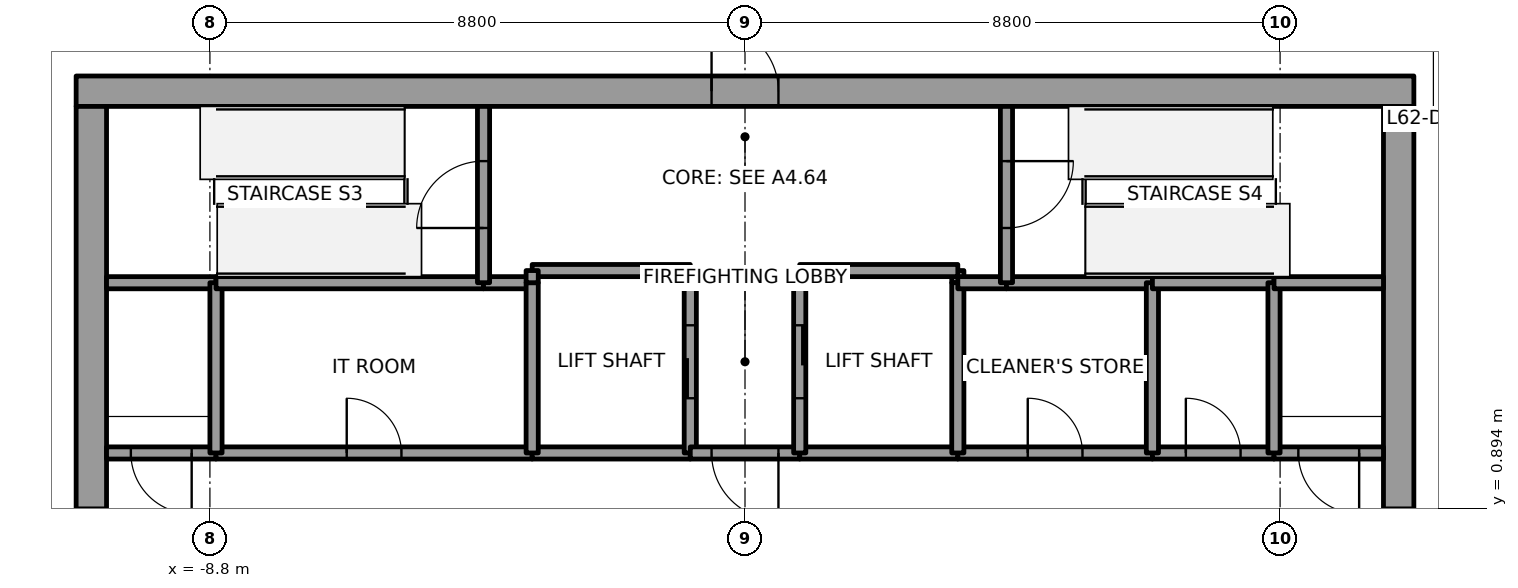
"""IFC4 building model, lengths in metres.
Left out: names, types, materials, properties, quantities, classifications, styles, units other than length and angle.
Written with IfcOpenShell. Run it as: python <this file> out.ifc"""

import sys

from ifc_helpers import new_model, si_unit, direction, frame, frame_2d, origin, place, context, subcontext, project, spatial, rectangle, extrude, element, fill, save


model = new_model("IFC4")
c1 = context("Model", 3, precision=1e-05, world=origin(), true_north=direction((0.0, 1.0)))
c2 = subcontext(c1, "Body", "Model", "MODEL_VIEW")
j1 = project(units=[si_unit("LENGTHUNIT", "METRE"), si_unit("PLANEANGLEUNIT", "RADIAN")], contexts=[c1])
p1 = place(None, origin())
s1 = spatial("IfcSite", under=j1, at=p1, CompositionType="ELEMENT")
p2 = place(p1, origin())
s2 = spatial("IfcBuilding", under=s1, at=p2, CompositionType="ELEMENT")
p3 = place(p2, frame((0.0, 0.0, 275.0)))
s3 = spatial("IfcBuildingStorey", under=s2, at=p3, CompositionType="ELEMENT", Elevation=275.0)
p4 = place(p3, frame((-11.0, 7.75, 0.0), z_axis=(0.0, 0.0, 1.0), x_axis=(1.0, 0.0, 0.0)))
e1 = element("IfcWall", 1, at=p4, inside=s3, PredefinedType="SHEAR", context=c2, shape_type="SweptSolid", body=[
    extrude(rectangle(XDim=22.0, YDim=0.5, at=frame_2d((11.0, 0.0))), origin(), (0.0, 0.0, 1.0), 4.0),
])
p5 = place(p4, frame((10.45, 0.0, 0.0)))
e2 = element("IfcOpeningElement", 2, at=p5, cuts=e1, PredefinedType="OPENING", context=c2, shape_type="SweptSolid", body=[
    extrude(rectangle(XDim=1.1, YDim=2.1, at=frame_2d((0.55, 1.05))), frame((0.0, 0.25, 0.0), z_axis=(0.0, -1.0, 0.0), x_axis=(1.0, 0.0, 0.0)), (0.0, 0.0, 1.0), 0.5),
])
p6 = place(p3, frame((-10.75, -7.5, 0.0), z_axis=(0.0, 0.0, 1.0), x_axis=(0.0, 1.0, 0.0)))
e3 = element("IfcWall", 3, at=p6, inside=s3, PredefinedType="SHEAR", context=c2, shape_type="SweptSolid", body=[
    extrude(rectangle(XDim=15.0, YDim=0.5, at=frame_2d((7.5, 0.0))), origin(), (0.0, 0.0, 1.0), 4.0),
])
p7 = place(p6, frame((6.6, 0.0, 0.0)))
e4 = element("IfcOpeningElement", 4, at=p7, cuts=e3, PredefinedType="OPENING", context=c2, shape_type="SweptSolid", body=[
    extrude(rectangle(XDim=1.8, YDim=2.1, at=frame_2d((0.9, 1.05))), frame((0.0, 0.25, 0.0), z_axis=(0.0, -1.0, 0.0), x_axis=(1.0, 0.0, 0.0)), (0.0, 0.0, 1.0), 0.5),
])
p8 = place(p3, frame((10.75, -7.5, 0.0), z_axis=(0.0, 0.0, 1.0), x_axis=(0.0, 1.0, 0.0)))
e5 = element("IfcWall", 5, at=p8, inside=s3, PredefinedType="SHEAR", context=c2, shape_type="SweptSolid", body=[
    extrude(rectangle(XDim=15.0, YDim=0.5, at=frame_2d((7.5, 0.0))), origin(), (0.0, 0.0, 1.0), 4.0),
])
p9 = place(p8, frame((6.6, 0.0, 0.0)))
e6 = element("IfcOpeningElement", 6, at=p9, cuts=e5, PredefinedType="OPENING", context=c2, shape_type="SweptSolid", body=[
    extrude(rectangle(XDim=1.8, YDim=2.1, at=frame_2d((0.9, 1.05))), frame((0.0, 0.25, 0.0), z_axis=(0.0, -1.0, 0.0), x_axis=(1.0, 0.0, 0.0)), (0.0, 0.0, 1.0), 0.5),
])
p10 = place(p3, frame((12.302, 8.068, 0.0), z_axis=(0.0, 0.0, 1.0), x_axis=(-0.523107588239, 0.852266654943, 0.0)))
e7 = element("IfcWall", 7, at=p10, inside=s3, PredefinedType="SOLIDWALL", context=c2, shape_type="SweptSolid", body=[
    extrude(rectangle(XDim=3.882, YDim=0.2, at=frame_2d((1.941, 0.0))), origin(), (0.0, 0.0, 1.0), 3.34),
])
p11 = place(p10, frame((1.326, 0.0, 0.0)))
e8 = element("IfcOpeningElement", 8, at=p11, cuts=e7, PredefinedType="OPENING", context=c2, shape_type="SweptSolid", body=[
    extrude(rectangle(XDim=1.1, YDim=2.1, at=frame_2d((0.55, 1.05))), frame((0.0, 0.1, 0.0), z_axis=(0.0, -1.0, 0.0), x_axis=(1.0, 0.0, 0.0)), (0.0, 0.0, 1.0), 0.2),
])
p12 = place(p3, frame((-8.7, 1.8, 0.0), z_axis=(0.0, 0.0, 1.0), x_axis=(-1.0, 0.0, 0.0)))
e9 = element("IfcWall", 9, at=p12, inside=s3, PredefinedType="SOLIDWALL", context=c2, shape_type="SweptSolid", body=[
    extrude(rectangle(XDim=1.8, YDim=0.2, at=frame_2d((0.9, 0.0))), origin(), (0.0, 0.0, 1.0), 3.85),
])
p13 = place(p12, frame((0.4, 0.0, 0.0)))
e10 = element("IfcOpeningElement", 10, at=p13, cuts=e9, PredefinedType="OPENING", context=c2, shape_type="SweptSolid", body=[
    extrude(rectangle(XDim=1.0, YDim=2.1, at=frame_2d((0.5, 1.05))), frame((0.0, 0.1, 0.0), z_axis=(0.0, -1.0, 0.0), x_axis=(1.0, 0.0, 0.0)), (0.0, 0.0, 1.0), 0.2),
])
p14 = place(p3, frame((-8.7, 4.6, 0.0), z_axis=(0.0, 0.0, 1.0), x_axis=(-1.0, 0.0, 0.0)))
e11 = element("IfcWall", 11, at=p14, inside=s3, PredefinedType="SOLIDWALL", context=c2, shape_type="SweptSolid", body=[
    extrude(rectangle(XDim=1.8, YDim=0.2, at=frame_2d((0.9, 0.0))), origin(), (0.0, 0.0, 1.0), 3.85),
])
p15 = place(p3, frame((-8.7, 1.8, 0.0), z_axis=(0.0, 0.0, 1.0), x_axis=(1.0, 0.0, 0.0)))
e12 = element("IfcWall", 12, at=p15, inside=s3, PredefinedType="SOLIDWALL", context=c2, shape_type="SweptSolid", body=[
    extrude(rectangle(XDim=5.2, YDim=0.2, at=frame_2d((2.6, 0.0))), origin(), (0.0, 0.0, 1.0), 3.85),
])
p16 = place(p15, frame((2.15, 0.0, 0.0)))
e13 = element("IfcOpeningElement", 13, at=p16, cuts=e12, PredefinedType="OPENING", context=c2, shape_type="SweptSolid", body=[
    extrude(rectangle(XDim=0.9, YDim=2.1, at=frame_2d((0.45, 1.05))), frame((0.0, 0.1, 0.0), z_axis=(0.0, -1.0, 0.0), x_axis=(1.0, 0.0, 0.0)), (0.0, 0.0, 1.0), 0.2),
])
p17 = place(p3, frame((-8.7, 4.6, 0.0), z_axis=(0.0, 0.0, 1.0), x_axis=(0.0, -1.0, 0.0)))
e14 = element("IfcWall", 14, at=p17, inside=s3, PredefinedType="SOLIDWALL", context=c2, shape_type="SweptSolid", body=[
    extrude(rectangle(XDim=2.8, YDim=0.2, at=frame_2d((1.4, 0.0))), origin(), (0.0, 0.0, 1.0), 3.85),
])
p18 = place(p3, frame((-4.3, 4.6, 0.0), z_axis=(0.0, 0.0, 1.0), x_axis=(-1.0, 0.0, 0.0)))
e15 = element("IfcWall", 15, at=p18, inside=s3, PredefinedType="SOLIDWALL", context=c2, shape_type="SweptSolid", body=[
    extrude(rectangle(XDim=4.4, YDim=0.2, at=frame_2d((2.2, 0.0))), origin(), (0.0, 0.0, 1.0), 3.85),
])
p19 = place(p3, frame((-3.5, 4.6, 0.0), z_axis=(0.0, 0.0, 1.0), x_axis=(-1.0, 0.0, 0.0)))
e16 = element("IfcWall", 16, at=p19, inside=s3, PredefinedType="SOLIDWALL", context=c2, shape_type="SweptSolid", body=[
    extrude(rectangle(XDim=0.8, YDim=0.2, at=frame_2d((0.4, 0.0))), origin(), (0.0, 0.0, 1.0), 3.85),
])
p20 = place(p3, frame((-4.3, 4.6, 0.0), z_axis=(0.0, 0.0, 1.0), x_axis=(0.0, 1.0, 0.0)))
e17 = element("IfcWall", 17, at=p20, inside=s3, PredefinedType="SOLIDWALL", context=c2, shape_type="SweptSolid", body=[
    extrude(rectangle(XDim=2.9, YDim=0.2, at=frame_2d((1.45, 0.0))), origin(), (0.0, 0.0, 1.0), 3.85),
])
p21 = place(p20, frame((0.9, 0.0, 0.0)))
e18 = element("IfcOpeningElement", 18, at=p21, cuts=e17, PredefinedType="OPENING", context=c2, shape_type="SweptSolid", body=[
    extrude(rectangle(XDim=1.1, YDim=2.1, at=frame_2d((0.55, 1.05))), frame((0.0, 0.1, 0.0), z_axis=(0.0, -1.0, 0.0), x_axis=(1.0, 0.0, 0.0)), (0.0, 0.0, 1.0), 0.2),
])
p22 = place(p3, frame((-0.9, 1.8, 0.0), z_axis=(0.0, 0.0, 1.0), x_axis=(-1.0, 0.0, 0.0)))
e19 = element("IfcWall", 19, at=p22, inside=s3, PredefinedType="SOLIDWALL", context=c2, shape_type="SweptSolid", body=[
    extrude(rectangle(XDim=2.6, YDim=0.2, at=frame_2d((1.3, 0.0))), origin(), (0.0, 0.0, 1.0), 3.85),
])
p23 = place(p3, frame((-3.5, 1.8, 0.0), z_axis=(0.0, 0.0, 1.0), x_axis=(0.0, 1.0, 0.0)))
e20 = element("IfcWall", 20, at=p23, inside=s3, PredefinedType="SOLIDWALL", context=c2, shape_type="SweptSolid", body=[
    extrude(rectangle(XDim=2.8, YDim=0.2, at=frame_2d((1.4, 0.0))), origin(), (0.0, 0.0, 1.0), 3.85),
])
p24 = place(p3, frame((-0.9, 1.8, 0.0), z_axis=(0.0, 0.0, 1.0), x_axis=(0.0, 1.0, 0.0)))
e21 = element("IfcWall", 21, at=p24, inside=s3, PredefinedType="SOLIDWALL", context=c2, shape_type="SweptSolid", body=[
    extrude(rectangle(XDim=3.0, YDim=0.2, at=frame_2d((1.5, 0.0))), origin(), (0.0, 0.0, 1.0), 3.85),
])
p25 = place(p24, frame((0.9, 0.0, 0.0)))
e22 = element("IfcOpeningElement", 22, at=p25, cuts=e21, PredefinedType="OPENING", context=c2, shape_type="SweptSolid", body=[
    extrude(rectangle(XDim=1.2, YDim=2.1, at=frame_2d((0.6, 1.05))), frame((0.0, 0.1, 0.0), z_axis=(0.0, -1.0, 0.0), x_axis=(1.0, 0.0, 0.0)), (0.0, 0.0, 1.0), 0.2),
])
p26 = place(p3, frame((-0.9, 4.8, 0.0), z_axis=(0.0, 0.0, 1.0), x_axis=(-1.0, 0.0, 0.0)))
e23 = element("IfcWall", 23, at=p26, inside=s3, PredefinedType="SOLIDWALL", context=c2, shape_type="SweptSolid", body=[
    extrude(rectangle(XDim=2.6, YDim=0.2, at=frame_2d((1.3, 0.0))), origin(), (0.0, 0.0, 1.0), 3.85),
])
p27 = place(p3, frame((-3.5, 4.8, 0.0), z_axis=(0.0, 0.0, 1.0), x_axis=(0.0, -1.0, 0.0)))
e24 = element("IfcWall", 24, at=p27, inside=s3, PredefinedType="SOLIDWALL", context=c2, shape_type="SweptSolid", body=[
    extrude(rectangle(XDim=0.2, YDim=0.2, at=frame_2d((0.1, 0.0))), origin(), (0.0, 0.0, 1.0), 3.85),
])
p28 = place(p3, frame((0.9, 1.8, 0.0), z_axis=(0.0, 0.0, 1.0), x_axis=(-1.0, 0.0, 0.0)))
e25 = element("IfcWall", 25, at=p28, inside=s3, PredefinedType="SOLIDWALL", context=c2, shape_type="SweptSolid", body=[
    extrude(rectangle(XDim=1.8, YDim=0.2, at=frame_2d((0.9, 0.0))), origin(), (0.0, 0.0, 1.0), 3.85),
])
p29 = place(p28, frame((0.35, 0.0, 0.0)))
e26 = element("IfcOpeningElement", 26, at=p29, cuts=e25, PredefinedType="OPENING", context=c2, shape_type="SweptSolid", body=[
    extrude(rectangle(XDim=1.1, YDim=2.1, at=frame_2d((0.55, 1.05))), frame((0.0, 0.1, 0.0), z_axis=(0.0, -1.0, 0.0), x_axis=(1.0, 0.0, 0.0)), (0.0, 0.0, 1.0), 0.2),
])
p30 = place(p3, frame((3.5, 1.8, 0.0), z_axis=(0.0, 0.0, 1.0), x_axis=(-1.0, 0.0, 0.0)))
e27 = element("IfcWall", 27, at=p30, inside=s3, PredefinedType="SOLIDWALL", context=c2, shape_type="SweptSolid", body=[
    extrude(rectangle(XDim=2.6, YDim=0.2, at=frame_2d((1.3, 0.0))), origin(), (0.0, 0.0, 1.0), 3.85),
])
p31 = place(p3, frame((3.5, 4.6, 0.0), z_axis=(0.0, 0.0, 1.0), x_axis=(0.0, 1.0, 0.0)))
e28 = element("IfcWall", 28, at=p31, inside=s3, PredefinedType="SOLIDWALL", context=c2, shape_type="SweptSolid", body=[
    extrude(rectangle(XDim=0.2, YDim=0.2, at=frame_2d((0.1, 0.0))), origin(), (0.0, 0.0, 1.0), 3.85),
])
p32 = place(p3, frame((3.5, 4.8, 0.0), z_axis=(0.0, 0.0, 1.0), x_axis=(-1.0, 0.0, 0.0)))
e29 = element("IfcWall", 29, at=p32, inside=s3, PredefinedType="SOLIDWALL", context=c2, shape_type="SweptSolid", body=[
    extrude(rectangle(XDim=2.6, YDim=0.2, at=frame_2d((1.3, 0.0))), origin(), (0.0, 0.0, 1.0), 3.85),
])
p33 = place(p3, frame((0.9, 4.8, 0.0), z_axis=(0.0, 0.0, 1.0), x_axis=(0.0, -1.0, 0.0)))
e30 = element("IfcWall", 30, at=p33, inside=s3, PredefinedType="SOLIDWALL", context=c2, shape_type="SweptSolid", body=[
    extrude(rectangle(XDim=3.0, YDim=0.2, at=frame_2d((1.5, 0.0))), origin(), (0.0, 0.0, 1.0), 3.85),
])
p34 = place(p33, frame((0.9, 0.0, 0.0)))
e31 = element("IfcOpeningElement", 31, at=p34, cuts=e30, PredefinedType="OPENING", context=c2, shape_type="SweptSolid", body=[
    extrude(rectangle(XDim=1.2, YDim=2.1, at=frame_2d((0.6, 1.05))), frame((0.0, 0.1, 0.0), z_axis=(0.0, -1.0, 0.0), x_axis=(1.0, 0.0, 0.0)), (0.0, 0.0, 1.0), 0.2),
])
p35 = place(p3, frame((3.5, 1.8, 0.0), z_axis=(0.0, 0.0, 1.0), x_axis=(1.0, 0.0, 0.0)))
e32 = element("IfcWall", 32, at=p35, inside=s3, PredefinedType="SOLIDWALL", context=c2, shape_type="SweptSolid", body=[
    extrude(rectangle(XDim=3.2, YDim=0.2, at=frame_2d((1.6, 0.0))), origin(), (0.0, 0.0, 1.0), 3.85),
])
p36 = place(p35, frame((1.15, 0.0, 0.0)))
e33 = element("IfcOpeningElement", 33, at=p36, cuts=e32, PredefinedType="OPENING", context=c2, shape_type="SweptSolid", body=[
    extrude(rectangle(XDim=0.9, YDim=2.1, at=frame_2d((0.45, 1.05))), frame((0.0, 0.1, 0.0), z_axis=(0.0, -1.0, 0.0), x_axis=(1.0, 0.0, 0.0)), (0.0, 0.0, 1.0), 0.2),
])
p37 = place(p3, frame((3.5, 4.6, 0.0), z_axis=(0.0, 0.0, 1.0), x_axis=(0.0, -1.0, 0.0)))
e34 = element("IfcWall", 34, at=p37, inside=s3, PredefinedType="SOLIDWALL", context=c2, shape_type="SweptSolid", body=[
    extrude(rectangle(XDim=2.8, YDim=0.2, at=frame_2d((1.4, 0.0))), origin(), (0.0, 0.0, 1.0), 3.85),
])
p38 = place(p3, frame((4.3, 4.6, 0.0), z_axis=(0.0, 0.0, 1.0), x_axis=(-1.0, 0.0, 0.0)))
e35 = element("IfcWall", 35, at=p38, inside=s3, PredefinedType="SOLIDWALL", context=c2, shape_type="SweptSolid", body=[
    extrude(rectangle(XDim=0.8, YDim=0.2, at=frame_2d((0.4, 0.0))), origin(), (0.0, 0.0, 1.0), 3.85),
])
p39 = place(p3, frame((6.7, 4.6, 0.0), z_axis=(0.0, 0.0, 1.0), x_axis=(-1.0, 0.0, 0.0)))
e36 = element("IfcWall", 36, at=p39, inside=s3, PredefinedType="SOLIDWALL", context=c2, shape_type="SweptSolid", body=[
    extrude(rectangle(XDim=2.4, YDim=0.2, at=frame_2d((1.2, 0.0))), origin(), (0.0, 0.0, 1.0), 3.85),
])
p40 = place(p3, frame((4.3, 7.5, 0.0), z_axis=(0.0, 0.0, 1.0), x_axis=(0.0, -1.0, 0.0)))
e37 = element("IfcWall", 37, at=p40, inside=s3, PredefinedType="SOLIDWALL", context=c2, shape_type="SweptSolid", body=[
    extrude(rectangle(XDim=2.9, YDim=0.2, at=frame_2d((1.45, 0.0))), origin(), (0.0, 0.0, 1.0), 3.85),
])
p41 = place(p40, frame((0.9, 0.0, 0.0)))
e38 = element("IfcOpeningElement", 38, at=p41, cuts=e37, PredefinedType="OPENING", context=c2, shape_type="SweptSolid", body=[
    extrude(rectangle(XDim=1.1, YDim=2.1, at=frame_2d((0.55, 1.05))), frame((0.0, 0.1, 0.0), z_axis=(0.0, -1.0, 0.0), x_axis=(1.0, 0.0, 0.0)), (0.0, 0.0, 1.0), 0.2),
])
p42 = place(p3, frame((6.7, 1.8, 0.0), z_axis=(0.0, 0.0, 1.0), x_axis=(1.0, 0.0, 0.0)))
e39 = element("IfcWall", 39, at=p42, inside=s3, PredefinedType="SOLIDWALL", context=c2, shape_type="SweptSolid", body=[
    extrude(rectangle(XDim=2.0, YDim=0.2, at=frame_2d((1.0, 0.0))), origin(), (0.0, 0.0, 1.0), 3.85),
])
p43 = place(p42, frame((0.55, 0.0, 0.0)))
e40 = element("IfcOpeningElement", 40, at=p43, cuts=e39, PredefinedType="OPENING", context=c2, shape_type="SweptSolid", body=[
    extrude(rectangle(XDim=0.9, YDim=2.1, at=frame_2d((0.45, 1.05))), frame((0.0, 0.1, 0.0), z_axis=(0.0, -1.0, 0.0), x_axis=(1.0, 0.0, 0.0)), (0.0, 0.0, 1.0), 0.2),
])
p44 = place(p3, frame((6.7, 1.8, 0.0), z_axis=(0.0, 0.0, 1.0), x_axis=(0.0, 1.0, 0.0)))
e41 = element("IfcWall", 41, at=p44, inside=s3, PredefinedType="SOLIDWALL", context=c2, shape_type="SweptSolid", body=[
    extrude(rectangle(XDim=2.8, YDim=0.2, at=frame_2d((1.4, 0.0))), origin(), (0.0, 0.0, 1.0), 3.85),
])
p45 = place(p3, frame((8.7, 4.6, 0.0), z_axis=(0.0, 0.0, 1.0), x_axis=(-1.0, 0.0, 0.0)))
e42 = element("IfcWall", 42, at=p45, inside=s3, PredefinedType="SOLIDWALL", context=c2, shape_type="SweptSolid", body=[
    extrude(rectangle(XDim=2.0, YDim=0.2, at=frame_2d((1.0, 0.0))), origin(), (0.0, 0.0, 1.0), 3.85),
])
p46 = place(p3, frame((10.5, 1.8, 0.0), z_axis=(0.0, 0.0, 1.0), x_axis=(-1.0, 0.0, 0.0)))
e43 = element("IfcWall", 43, at=p46, inside=s3, PredefinedType="SOLIDWALL", context=c2, shape_type="SweptSolid", body=[
    extrude(rectangle(XDim=1.8, YDim=0.2, at=frame_2d((0.9, 0.0))), origin(), (0.0, 0.0, 1.0), 3.85),
])
p47 = place(p46, frame((0.4, 0.0, 0.0)))
e44 = element("IfcOpeningElement", 44, at=p47, cuts=e43, PredefinedType="OPENING", context=c2, shape_type="SweptSolid", body=[
    extrude(rectangle(XDim=1.0, YDim=2.1, at=frame_2d((0.5, 1.05))), frame((0.0, 0.1, 0.0), z_axis=(0.0, -1.0, 0.0), x_axis=(1.0, 0.0, 0.0)), (0.0, 0.0, 1.0), 0.2),
])
p48 = place(p3, frame((8.7, 1.8, 0.0), z_axis=(0.0, 0.0, 1.0), x_axis=(0.0, 1.0, 0.0)))
e45 = element("IfcWall", 45, at=p48, inside=s3, PredefinedType="SOLIDWALL", context=c2, shape_type="SweptSolid", body=[
    extrude(rectangle(XDim=2.8, YDim=0.2, at=frame_2d((1.4, 0.0))), origin(), (0.0, 0.0, 1.0), 3.85),
])
p49 = place(p3, frame((10.5, 4.6, 0.0), z_axis=(0.0, 0.0, 1.0), x_axis=(-1.0, 0.0, 0.0)))
e46 = element("IfcWall", 46, at=p49, inside=s3, PredefinedType="SOLIDWALL", context=c2, shape_type="SweptSolid", body=[
    extrude(rectangle(XDim=1.8, YDim=0.2, at=frame_2d((0.9, 0.0))), origin(), (0.0, 0.0, 1.0), 3.85),
])
p50 = place(p25, origin())
e47 = element("IfcDoor", 47, at=p50, inside=s3, OperationType="SLIDING_TO_RIGHT", PredefinedType="DOOR", context=c2, shape_type="SweptSolid", body=[
    extrude(rectangle(XDim=1.2, YDim=2.1, at=frame_2d((0.6, 1.05))), frame((0.0, 0.025, 0.0), z_axis=(0.0, -1.0, 0.0), x_axis=(1.0, 0.0, 0.0)), (0.0, 0.0, 1.0), 0.05),
])
fill(e22, e47)
p51 = place(p34, origin())
e48 = element("IfcDoor", 48, at=p51, inside=s3, OperationType="SLIDING_TO_RIGHT", PredefinedType="DOOR", context=c2, shape_type="SweptSolid", body=[
    extrude(rectangle(XDim=1.2, YDim=2.1, at=frame_2d((0.6, 1.05))), frame((0.0, 0.025, 0.0), z_axis=(0.0, -1.0, 0.0), x_axis=(1.0, 0.0, 0.0)), (0.0, 0.0, 1.0), 0.05),
])
fill(e31, e48)
p52 = place(p29, origin())
e49 = element("IfcDoor", 49, at=p52, inside=s3, OperationType="SINGLE_SWING_RIGHT", PredefinedType="DOOR", context=c2, shape_type="SweptSolid", body=[
    extrude(rectangle(XDim=1.1, YDim=2.1, at=frame_2d((0.55, 1.05))), frame((0.0, 0.025, 0.0), z_axis=(0.0, -1.0, 0.0), x_axis=(1.0, 0.0, 0.0)), (0.0, 0.0, 1.0), 0.05),
])
fill(e26, e49)
p53 = place(p13, origin())
e50 = element("IfcDoor", 50, at=p53, inside=s3, OperationType="SINGLE_SWING_RIGHT", PredefinedType="DOOR", context=c2, shape_type="SweptSolid", body=[
    extrude(rectangle(XDim=1.0, YDim=2.1, at=frame_2d((0.5, 1.05))), frame((0.0, 0.025, 0.0), z_axis=(0.0, -1.0, 0.0), x_axis=(1.0, 0.0, 0.0)), (0.0, 0.0, 1.0), 0.05),
])
fill(e10, e50)
p54 = place(p47, origin())
e51 = element("IfcDoor", 51, at=p54, inside=s3, OperationType="SINGLE_SWING_RIGHT", PredefinedType="DOOR", context=c2, shape_type="SweptSolid", body=[
    extrude(rectangle(XDim=1.0, YDim=2.1, at=frame_2d((0.5, 1.05))), frame((0.0, 0.025, 0.0), z_axis=(0.0, -1.0, 0.0), x_axis=(1.0, 0.0, 0.0)), (0.0, 0.0, 1.0), 0.05),
])
fill(e44, e51)
p55 = place(p21, origin())
e52 = element("IfcDoor", 52, at=p55, inside=s3, OperationType="SINGLE_SWING_LEFT", PredefinedType="DOOR", context=c2, shape_type="SweptSolid", body=[
    extrude(rectangle(XDim=1.1, YDim=2.1, at=frame_2d((0.55, 1.05))), frame((0.0, 0.025, 0.0), z_axis=(0.0, -1.0, 0.0), x_axis=(1.0, 0.0, 0.0)), (0.0, 0.0, 1.0), 0.05),
])
fill(e18, e52)
p56 = place(p41, origin())
e53 = element("IfcDoor", 53, at=p56, inside=s3, OperationType="SINGLE_SWING_LEFT", PredefinedType="DOOR", context=c2, shape_type="SweptSolid", body=[
    extrude(rectangle(XDim=1.1, YDim=2.1, at=frame_2d((0.55, 1.05))), frame((0.0, 0.025, 0.0), z_axis=(0.0, -1.0, 0.0), x_axis=(1.0, 0.0, 0.0)), (0.0, 0.0, 1.0), 0.05),
])
fill(e38, e53)
p57 = place(p36, origin())
e54 = element("IfcDoor", 54, at=p57, inside=s3, OperationType="SINGLE_SWING_LEFT", PredefinedType="DOOR", context=c2, shape_type="SweptSolid", body=[
    extrude(rectangle(XDim=0.9, YDim=2.1, at=frame_2d((0.45, 1.05))), frame((0.0, 0.025, 0.0), z_axis=(0.0, -1.0, 0.0), x_axis=(1.0, 0.0, 0.0)), (0.0, 0.0, 1.0), 0.05),
])
fill(e33, e54)
p58 = place(p43, origin())
e55 = element("IfcDoor", 55, at=p58, inside=s3, OperationType="SINGLE_SWING_LEFT", PredefinedType="DOOR", context=c2, shape_type="SweptSolid", body=[
    extrude(rectangle(XDim=0.9, YDim=2.1, at=frame_2d((0.45, 1.05))), frame((0.0, 0.025, 0.0), z_axis=(0.0, -1.0, 0.0), x_axis=(1.0, 0.0, 0.0)), (0.0, 0.0, 1.0), 0.05),
])
fill(e40, e55)
p59 = place(p16, origin())
e56 = element("IfcDoor", 56, at=p59, inside=s3, OperationType="SINGLE_SWING_LEFT", PredefinedType="DOOR", context=c2, shape_type="SweptSolid", body=[
    extrude(rectangle(XDim=0.9, YDim=2.1, at=frame_2d((0.45, 1.05))), frame((0.0, 0.025, 0.0), z_axis=(0.0, -1.0, 0.0), x_axis=(1.0, 0.0, 0.0)), (0.0, 0.0, 1.0), 0.05),
])
fill(e13, e56)
p60 = place(p7, origin())
e57 = element("IfcDoor", 57, at=p60, inside=s3, OperationType="DOUBLE_DOOR_SINGLE_SWING", PredefinedType="DOOR", context=c2, shape_type="SweptSolid", body=[
    extrude(rectangle(XDim=1.8, YDim=2.1, at=frame_2d((0.9, 1.05))), frame((0.0, 0.025, 0.0), z_axis=(0.0, -1.0, 0.0), x_axis=(1.0, 0.0, 0.0)), (0.0, 0.0, 1.0), 0.05),
])
fill(e4, e57)
p61 = place(p9, origin())
e58 = element("IfcDoor", 58, at=p61, inside=s3, OperationType="DOUBLE_DOOR_SINGLE_SWING", PredefinedType="DOOR", context=c2, shape_type="SweptSolid", body=[
    extrude(rectangle(XDim=1.8, YDim=2.1, at=frame_2d((0.9, 1.05))), frame((0.0, 0.025, 0.0), z_axis=(0.0, -1.0, 0.0), x_axis=(1.0, 0.0, 0.0)), (0.0, 0.0, 1.0), 0.05),
])
fill(e6, e58)
p62 = place(p5, origin())
e59 = element("IfcDoor", 59, at=p62, inside=s3, OperationType="SINGLE_SWING_RIGHT", PredefinedType="DOOR", context=c2, shape_type="SweptSolid", body=[
    extrude(rectangle(XDim=1.1, YDim=2.1, at=frame_2d((0.55, 1.05))), frame((0.0, 0.025, 0.0), z_axis=(0.0, -1.0, 0.0), x_axis=(1.0, 0.0, 0.0)), (0.0, 0.0, 1.0), 0.05),
])
fill(e2, e59)
save(model, sys.argv[1])
